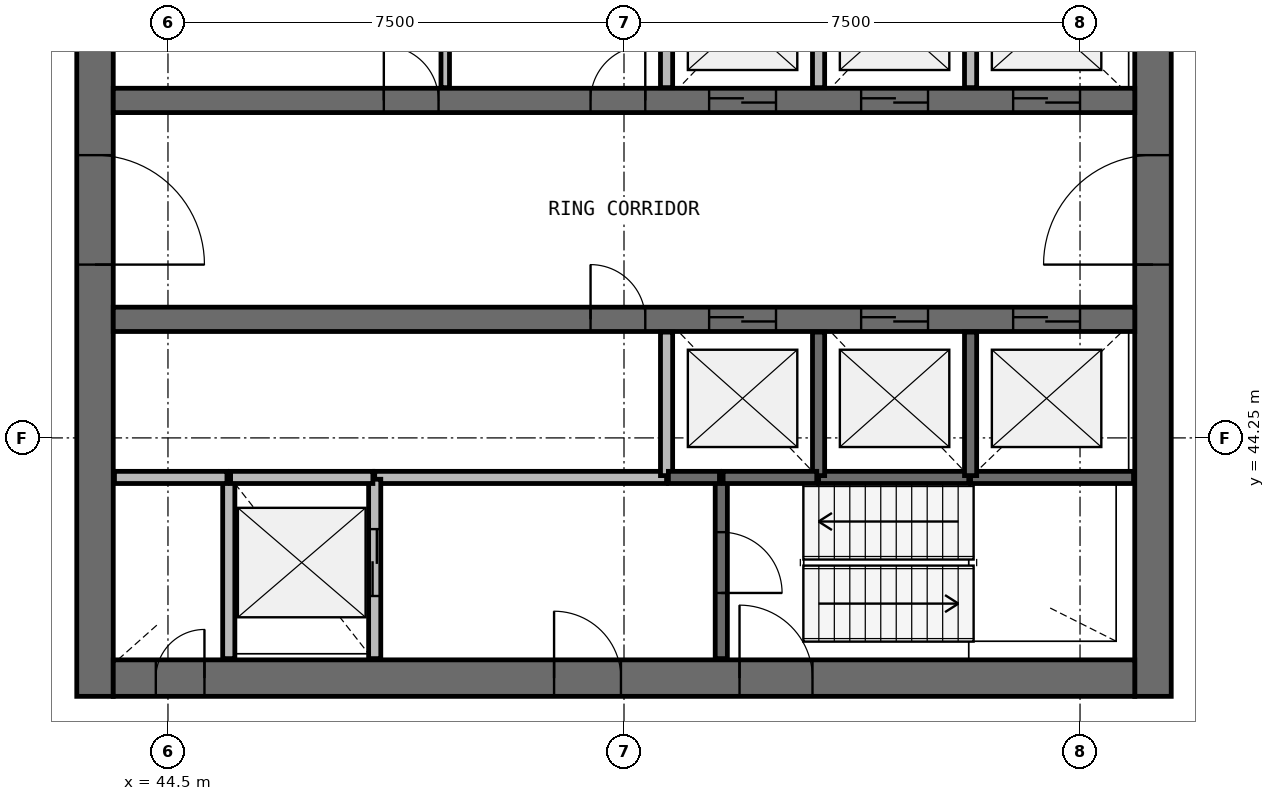
"""IFC4 building model, lengths in metres.
Left out: names, types, materials, properties, quantities, classifications, styles, units other than length and angle.
Written with IfcOpenShell. Run it as: python <this file> out.ifc"""

import sys

from ifc_helpers import new_model, si_unit, direction, frame, frame_2d, origin, place, context, subcontext, project, spatial, rectangle, extrude, source, transform, mapped, element, fill, save


model = new_model("IFC4")
c1 = context("Model", 3, precision=1e-05, world=origin(), true_north=direction((0.0, 1.0)))
c2 = subcontext(c1, "Body", "Model", "MODEL_VIEW")
j1 = project(units=[si_unit("LENGTHUNIT", "METRE"), si_unit("PLANEANGLEUNIT", "RADIAN")], contexts=[c1])
p1 = place(None, origin())
s1 = spatial("IfcSite", under=j1, at=p1, CompositionType="ELEMENT")
p2 = place(p1, origin())
s2 = spatial("IfcBuilding", under=s1, at=p2, CompositionType="ELEMENT")
p3 = place(p2, frame((0.0, 0.0, 187.7)))
s3 = spatial("IfcBuildingStorey", under=s2, at=p3, CompositionType="ELEMENT", Elevation=187.7)
p4 = place(p3, frame((60.7, 40.0, 0.0), z_axis=(0.0, 0.0, 1.0), x_axis=(0.0, 1.0, 0.0)))
e1 = element("IfcWall", 1, at=p4, inside=s3, PredefinedType="SHEAR", context=c2, shape_type="SweptSolid", body=[
    extrude(rectangle(XDim=16.0, YDim=0.6, at=frame_2d((8.0, 0.0))), origin(), (0.0, 0.0, 1.0), 3.9),
])
p5 = place(p4, frame((7.1, 0.0, 0.0)))
e2 = element("IfcOpeningElement", 2, at=p5, cuts=e1, PredefinedType="OPENING", context=c2, shape_type="SweptSolid", body=[
    extrude(rectangle(XDim=1.8, YDim=2.1, at=frame_2d((0.9, 1.05))), frame((0.0, 0.31, 0.0), z_axis=(0.0, -1.0, 0.0), x_axis=(1.0, 0.0, 0.0)), (0.0, 0.0, 1.0), 0.62),
])
p6 = place(p3, frame((43.3, 56.0, 0.0), z_axis=(0.0, 0.0, 1.0), x_axis=(0.0, -1.0, 0.0)))
e3 = element("IfcWall", 3, at=p6, inside=s3, PredefinedType="SHEAR", context=c2, shape_type="SweptSolid", body=[
    extrude(rectangle(XDim=16.0, YDim=0.6, at=frame_2d((8.0, 0.0))), origin(), (0.0, 0.0, 1.0), 3.9),
])
p7 = place(p6, frame((7.1, 0.0, 0.0)))
e4 = element("IfcOpeningElement", 4, at=p7, cuts=e3, PredefinedType="OPENING", context=c2, shape_type="SweptSolid", body=[
    extrude(rectangle(XDim=1.8, YDim=2.1, at=frame_2d((0.9, 1.05))), frame((0.0, 0.31, 0.0), z_axis=(0.0, -1.0, 0.0), x_axis=(1.0, 0.0, 0.0)), (0.0, 0.0, 1.0), 0.62),
])
p8 = place(p3, frame((43.6, 40.3, 0.0), z_axis=(0.0, 0.0, 1.0), x_axis=(1.0, 0.0, 0.0)))
e5 = element("IfcWall", 5, at=p8, inside=s3, PredefinedType="SHEAR", context=c2, shape_type="SweptSolid", body=[
    extrude(rectangle(XDim=16.8, YDim=0.6, at=frame_2d((8.4, 0.0))), origin(), (0.0, 0.0, 1.0), 3.9),
])
p9 = place(p8, frame((10.3, 0.0, 0.0)))
e6 = element("IfcOpeningElement", 6, at=p9, cuts=e5, PredefinedType="OPENING", context=c2, shape_type="SweptSolid", body=[
    extrude(rectangle(XDim=1.2, YDim=2.1, at=frame_2d((0.6, 1.05))), frame((0.0, 0.31, 0.0), z_axis=(0.0, -1.0, 0.0), x_axis=(1.0, 0.0, 0.0)), (0.0, 0.0, 1.0), 0.62),
])
p10 = place(p8, frame((7.25, 0.0, 0.0)))
e7 = element("IfcOpeningElement", 7, at=p10, cuts=e5, PredefinedType="OPENING", context=c2, shape_type="SweptSolid", body=[
    extrude(rectangle(XDim=1.1, YDim=2.1, at=frame_2d((0.55, 1.05))), frame((0.0, 0.31, 0.0), z_axis=(0.0, -1.0, 0.0), x_axis=(1.0, 0.0, 0.0)), (0.0, 0.0, 1.0), 0.62),
])
p11 = place(p8, frame((0.7, 0.0, 0.0)))
e8 = element("IfcOpeningElement", 8, at=p11, cuts=e5, PredefinedType="OPENING", context=c2, shape_type="SweptSolid", body=[
    extrude(rectangle(XDim=0.8, YDim=2.1, at=frame_2d((0.4, 1.05))), frame((0.0, 0.31, 0.0), z_axis=(0.0, -1.0, 0.0), x_axis=(1.0, 0.0, 0.0)), (0.0, 0.0, 1.0), 0.62),
])
p12 = place(p3, frame((43.6, 49.8, 0.0), z_axis=(0.0, 0.0, 1.0), x_axis=(1.0, 0.0, 0.0)))
e9 = element("IfcWall", 9, at=p12, inside=s3, PredefinedType="SHEAR", context=c2, shape_type="SweptSolid", body=[
    extrude(rectangle(XDim=16.8, YDim=0.4, at=frame_2d((8.4, 0.0))), origin(), (0.0, 0.0, 1.0), 3.9),
])
p13 = place(p12, frame((9.8, 0.0, 0.0)))
e10 = element("IfcOpeningElement", 10, at=p13, cuts=e9, PredefinedType="OPENING", context=c2, shape_type="SweptSolid", body=[
    extrude(rectangle(XDim=1.1, YDim=2.1, at=frame_2d((0.55, 1.05))), frame((0.0, 0.21, 0.0), z_axis=(0.0, -1.0, 0.0), x_axis=(1.0, 0.0, 0.0)), (0.0, 0.0, 1.0), 0.42),
])
p14 = place(p12, frame((12.3, 0.0, 0.0)))
e11 = element("IfcOpeningElement", 11, at=p14, cuts=e9, PredefinedType="OPENING", context=c2, shape_type="SweptSolid", body=[
    extrude(rectangle(XDim=1.1, YDim=2.1, at=frame_2d((0.55, 1.05))), frame((0.0, 0.21, 0.0), z_axis=(0.0, -1.0, 0.0), x_axis=(1.0, 0.0, 0.0)), (0.0, 0.0, 1.0), 0.42),
])
p15 = place(p12, frame((14.8, 0.0, 0.0)))
e12 = element("IfcOpeningElement", 12, at=p15, cuts=e9, PredefinedType="OPENING", context=c2, shape_type="SweptSolid", body=[
    extrude(rectangle(XDim=1.1, YDim=2.1, at=frame_2d((0.55, 1.05))), frame((0.0, 0.21, 0.0), z_axis=(0.0, -1.0, 0.0), x_axis=(1.0, 0.0, 0.0)), (0.0, 0.0, 1.0), 0.42),
])
p16 = place(p12, frame((4.45, 0.0, 0.0)))
e13 = element("IfcOpeningElement", 13, at=p16, cuts=e9, PredefinedType="OPENING", context=c2, shape_type="SweptSolid", body=[
    extrude(rectangle(XDim=0.9, YDim=2.1, at=frame_2d((0.45, 1.05))), frame((0.0, 0.21, 0.0), z_axis=(0.0, -1.0, 0.0), x_axis=(1.0, 0.0, 0.0)), (0.0, 0.0, 1.0), 0.42),
])
p17 = place(p12, frame((7.85, 0.0, 0.0)))
e14 = element("IfcOpeningElement", 14, at=p17, cuts=e9, PredefinedType="OPENING", context=c2, shape_type="SweptSolid", body=[
    extrude(rectangle(XDim=0.9, YDim=2.1, at=frame_2d((0.45, 1.05))), frame((0.0, 0.21, 0.0), z_axis=(0.0, -1.0, 0.0), x_axis=(1.0, 0.0, 0.0)), (0.0, 0.0, 1.0), 0.42),
])
p18 = place(p3, frame((43.6, 46.2, 0.0), z_axis=(0.0, 0.0, 1.0), x_axis=(1.0, 0.0, 0.0)))
e15 = element("IfcWall", 15, at=p18, inside=s3, PredefinedType="SHEAR", context=c2, shape_type="SweptSolid", body=[
    extrude(rectangle(XDim=16.8, YDim=0.4, at=frame_2d((8.4, 0.0))), origin(), (0.0, 0.0, 1.0), 3.9),
])
p19 = place(p18, frame((9.8, 0.0, 0.0)))
e16 = element("IfcOpeningElement", 16, at=p19, cuts=e15, PredefinedType="OPENING", context=c2, shape_type="SweptSolid", body=[
    extrude(rectangle(XDim=1.1, YDim=2.1, at=frame_2d((0.55, 1.05))), frame((0.0, 0.21, 0.0), z_axis=(0.0, -1.0, 0.0), x_axis=(1.0, 0.0, 0.0)), (0.0, 0.0, 1.0), 0.42),
])
p20 = place(p18, frame((12.3, 0.0, 0.0)))
e17 = element("IfcOpeningElement", 17, at=p20, cuts=e15, PredefinedType="OPENING", context=c2, shape_type="SweptSolid", body=[
    extrude(rectangle(XDim=1.1, YDim=2.1, at=frame_2d((0.55, 1.05))), frame((0.0, 0.21, 0.0), z_axis=(0.0, -1.0, 0.0), x_axis=(1.0, 0.0, 0.0)), (0.0, 0.0, 1.0), 0.42),
])
p21 = place(p18, frame((14.8, 0.0, 0.0)))
e18 = element("IfcOpeningElement", 18, at=p21, cuts=e15, PredefinedType="OPENING", context=c2, shape_type="SweptSolid", body=[
    extrude(rectangle(XDim=1.1, YDim=2.1, at=frame_2d((0.55, 1.05))), frame((0.0, 0.21, 0.0), z_axis=(0.0, -1.0, 0.0), x_axis=(1.0, 0.0, 0.0)), (0.0, 0.0, 1.0), 0.42),
])
p22 = place(p18, frame((7.85, 0.0, 0.0)))
e19 = element("IfcOpeningElement", 19, at=p22, cuts=e15, PredefinedType="OPENING", context=c2, shape_type="SweptSolid", body=[
    extrude(rectangle(XDim=0.9, YDim=2.1, at=frame_2d((0.45, 1.05))), frame((0.0, 0.21, 0.0), z_axis=(0.0, -1.0, 0.0), x_axis=(1.0, 0.0, 0.0)), (0.0, 0.0, 1.0), 0.42),
])
p23 = place(p3, frame((52.7, 43.6, 0.0), z_axis=(0.0, 0.0, 1.0), x_axis=(-1.0, 0.0, 0.0)))
e20 = element("IfcWall", 20, at=p23, inside=s3, PredefinedType="SOLIDWALL", context=c2, shape_type="SweptSolid", body=[
    extrude(rectangle(XDim=4.8, YDim=0.2, at=frame_2d((2.4, 0.0))), origin(), (0.0, 0.0, 1.0), 3.58),
])
p24 = place(p3, frame((45.5, 43.6, 0.0), z_axis=(0.0, 0.0, 1.0), x_axis=(0.0, -1.0, 0.0)))
e21 = element("IfcWall", 21, at=p24, inside=s3, PredefinedType="SOLIDWALL", context=c2, shape_type="SweptSolid", body=[
    extrude(rectangle(XDim=2.98, YDim=0.2, at=frame_2d((1.49, 0.0))), origin(), (0.0, 0.0, 1.0), 3.58),
])
p25 = place(p3, frame((47.9, 40.62, 0.0), z_axis=(0.0, 0.0, 1.0), x_axis=(0.0, 1.0, 0.0)))
e22 = element("IfcWall", 22, at=p25, inside=s3, PredefinedType="SOLIDWALL", context=c2, shape_type="SweptSolid", body=[
    extrude(rectangle(XDim=2.95, YDim=0.2, at=frame_2d((1.475, 0.0))), origin(), (0.0, 0.0, 1.0), 3.58),
])
p26 = place(p25, frame((1.03, 0.0, 0.0)))
e23 = element("IfcOpeningElement", 23, at=p26, cuts=e22, PredefinedType="OPENING", context=c2, shape_type="SweptSolid", body=[
    extrude(rectangle(XDim=1.1, YDim=2.1, at=frame_2d((0.55, 1.05))), frame((0.0, 0.11, 0.0), z_axis=(0.0, -1.0, 0.0), x_axis=(1.0, 0.0, 0.0)), (0.0, 0.0, 1.0), 0.22),
])
p27 = place(p3, frame((53.6, 43.6, 0.0), z_axis=(0.0, 0.0, 1.0), x_axis=(0.0, -1.0, 0.0)))
e24 = element("IfcWall", 24, at=p27, inside=s3, PredefinedType="SOLIDWALL", context=c2, shape_type="SweptSolid", body=[
    extrude(rectangle(XDim=2.98, YDim=0.2, at=frame_2d((1.49, 0.0))), origin(), (0.0, 0.0, 1.0), 3.58),
])
p28 = place(p27, frame((0.9, 0.0, 0.0)))
e25 = element("IfcOpeningElement", 25, at=p28, cuts=e24, PredefinedType="OPENING", context=c2, shape_type="SweptSolid", body=[
    extrude(rectangle(XDim=1.0, YDim=2.1, at=frame_2d((0.5, 1.05))), frame((0.0, 0.11, 0.0), z_axis=(0.0, -1.0, 0.0), x_axis=(1.0, 0.0, 0.0)), (0.0, 0.0, 1.0), 0.22),
])
p29 = place(p3, frame((57.7, 43.6, 0.0), z_axis=(0.0, 0.0, 1.0), x_axis=(1.0, 0.0, 0.0)))
e26 = element("IfcWall", 26, at=p29, inside=s3, PredefinedType="SOLIDWALL", context=c2, shape_type="SweptSolid", body=[
    extrude(rectangle(XDim=2.68, YDim=0.2, at=frame_2d((1.34, 0.0))), origin(), (0.0, 0.0, 1.0), 3.58),
])
p30 = place(p3, frame((55.2, 43.6, 0.0), z_axis=(0.0, 0.0, 1.0), x_axis=(1.0, 0.0, 0.0)))
e27 = element("IfcWall", 27, at=p30, inside=s3, PredefinedType="SOLIDWALL", context=c2, shape_type="SweptSolid", body=[
    extrude(rectangle(XDim=2.47, YDim=0.2, at=frame_2d((1.235, 0.0))), origin(), (0.0, 0.0, 1.0), 3.58),
])
p31 = place(p3, frame((47.87, 43.6, 0.0), z_axis=(0.0, 0.0, 1.0), x_axis=(-1.0, 0.0, 0.0)))
e28 = element("IfcWall", 28, at=p31, inside=s3, PredefinedType="SOLIDWALL", context=c2, shape_type="SweptSolid", body=[
    extrude(rectangle(XDim=2.34, YDim=0.2, at=frame_2d((1.17, 0.0))), origin(), (0.0, 0.0, 1.0), 3.58),
])
for number, where, z_axis, x_axis in (
    (29, (52.7, 45.99, 0.0), (0.0, 0.0, 1.0), (0.0, -1.0, 0.0)),
    (30, (52.7, 52.37, 0.0), (0.0, 0.0, 1.0), (0.0, -1.0, 0.0)),
    (31, (55.2, 43.63, 0.0), (0.0, 0.0, 1.0), (0.0, 1.0, 0.0)),
    (32, (55.2, 50.01, 0.0), (0.0, 0.0, 1.0), (0.0, 1.0, 0.0)),
    (33, (57.7, 43.63, 0.0), (0.0, 0.0, 1.0), (0.0, 1.0, 0.0)),
):
    element("IfcWall", number, at=place(p3, frame(where, z_axis=z_axis, x_axis=x_axis)), inside=s3, PredefinedType="SOLIDWALL", context=c2, shape_type="SweptSolid", body=[
        extrude(rectangle(XDim=2.36, YDim=0.2, at=frame_2d((1.18, 0.0))), origin(), (0.0, 0.0, 1.0), 3.58),
    ])
p32 = place(p3, frame((57.7, 50.01, 0.0), z_axis=(0.0, 0.0, 1.0), x_axis=(0.0, 1.0, 0.0)))
e34 = element("IfcWall", 34, at=p32, inside=s3, PredefinedType="SOLIDWALL", context=c2, shape_type="SweptSolid", body=[
    extrude(rectangle(XDim=2.39, YDim=0.2, at=frame_2d((1.195, 0.0))), origin(), (0.0, 0.0, 1.0), 3.58),
])
p33 = place(p3, frame((45.47, 43.6, 0.0), z_axis=(0.0, 0.0, 1.0), x_axis=(-1.0, 0.0, 0.0)))
e35 = element("IfcWall", 35, at=p33, inside=s3, PredefinedType="SOLIDWALL", context=c2, shape_type="SweptSolid", body=[
    extrude(rectangle(XDim=1.85, YDim=0.2, at=frame_2d((0.925, 0.0))), origin(), (0.0, 0.0, 1.0), 3.58),
])
p34 = place(p3, frame((53.63, 43.6, 0.0), z_axis=(0.0, 0.0, 1.0), x_axis=(1.0, 0.0, 0.0)))
e36 = element("IfcWall", 36, at=p34, inside=s3, PredefinedType="SOLIDWALL", context=c2, shape_type="SweptSolid", body=[
    extrude(rectangle(XDim=1.54, YDim=0.2, at=frame_2d((0.77, 0.0))), origin(), (0.0, 0.0, 1.0), 3.58),
])
p35 = place(p3, frame((52.73, 43.6, 0.0), z_axis=(0.0, 0.0, 1.0), x_axis=(1.0, 0.0, 0.0)))
e37 = element("IfcWall", 37, at=p35, inside=s3, PredefinedType="SOLIDWALL", context=c2, shape_type="SweptSolid", body=[
    extrude(rectangle(XDim=0.84, YDim=0.2, at=frame_2d((0.42, 0.0))), origin(), (0.0, 0.0, 1.0), 3.58),
])
p36 = place(p3, frame((49.06, 50.01, 0.0), z_axis=(0.0, 0.0, 1.0), x_axis=(0.0, 1.0, 0.0)))
e38 = element("IfcWall", 38, at=p36, inside=s3, PredefinedType="PARTITIONING", context=c2, shape_type="SweptSolid", body=[
    extrude(rectangle(XDim=2.29, YDim=0.14, at=frame_2d((1.145, 0.0))), origin(), (0.0, 0.0, 1.0), 2.88),
])
m1 = source(origin(), c2, "Body", "SweptSolid", [
    extrude(rectangle(XDim=1.8, YDim=2.1, at=frame_2d((0.9, 1.05))), frame((0.0, 0.025, 0.0), z_axis=(0.0, -1.0, 0.0), x_axis=(1.0, 0.0, 0.0)), (0.0, 0.0, 1.0), 0.05),
])
p37 = place(p7, origin())
e39 = element("IfcDoor", 39, at=p37, inside=s3, OperationType="SINGLE_SWING_RIGHT", PredefinedType="DOOR", context=c2, shape_type="MappedRepresentation", body=[
    mapped(m1, transform((0.0, 0.0, 0.0), scale=1.0)),
])
fill(e4, e39)
p38 = place(p5, origin())
e40 = element("IfcDoor", 40, at=p38, inside=s3, OperationType="SINGLE_SWING_LEFT", PredefinedType="DOOR", context=c2, shape_type="MappedRepresentation", body=[
    mapped(m1, transform((0.0, 0.0, 0.0), scale=1.0)),
])
fill(e2, e40)
m2 = source(origin(), c2, "Body", "SweptSolid", [
    extrude(rectangle(XDim=1.1, YDim=2.1, at=frame_2d((0.55, 1.05))), frame((0.0, 0.025, 0.0), z_axis=(0.0, -1.0, 0.0), x_axis=(1.0, 0.0, 0.0)), (0.0, 0.0, 1.0), 0.05),
])
p39 = place(p13, origin())
e41 = element("IfcDoor", 41, at=p39, inside=s3, OperationType="DOUBLE_DOOR_SLIDING", PredefinedType="USERDEFINED", context=c2, shape_type="MappedRepresentation", body=[
    mapped(m2, transform((0.0, 0.0, 0.0), scale=1.0)),
])
fill(e10, e41)
p40 = place(p14, origin())
e42 = element("IfcDoor", 42, at=p40, inside=s3, OperationType="DOUBLE_DOOR_SLIDING", PredefinedType="USERDEFINED", context=c2, shape_type="MappedRepresentation", body=[
    mapped(m2, transform((0.0, 0.0, 0.0), scale=1.0)),
])
fill(e11, e42)
p41 = place(p15, origin())
e43 = element("IfcDoor", 43, at=p41, inside=s3, OperationType="DOUBLE_DOOR_SLIDING", PredefinedType="USERDEFINED", context=c2, shape_type="MappedRepresentation", body=[
    mapped(m2, transform((0.0, 0.0, 0.0), scale=1.0)),
])
fill(e12, e43)
p42 = place(p19, origin())
e44 = element("IfcDoor", 44, at=p42, inside=s3, OperationType="DOUBLE_DOOR_SLIDING", PredefinedType="USERDEFINED", context=c2, shape_type="MappedRepresentation", body=[
    mapped(m2, transform((0.0, 0.0, 0.0), scale=1.0)),
])
fill(e16, e44)
p43 = place(p20, origin())
e45 = element("IfcDoor", 45, at=p43, inside=s3, OperationType="DOUBLE_DOOR_SLIDING", PredefinedType="USERDEFINED", context=c2, shape_type="MappedRepresentation", body=[
    mapped(m2, transform((0.0, 0.0, 0.0), scale=1.0)),
])
fill(e17, e45)
p44 = place(p21, origin())
e46 = element("IfcDoor", 46, at=p44, inside=s3, OperationType="DOUBLE_DOOR_SLIDING", PredefinedType="USERDEFINED", context=c2, shape_type="MappedRepresentation", body=[
    mapped(m2, transform((0.0, 0.0, 0.0), scale=1.0)),
])
fill(e18, e46)
p45 = place(p26, origin())
e47 = element("IfcDoor", 47, at=p45, inside=s3, OperationType="DOUBLE_DOOR_SLIDING", PredefinedType="USERDEFINED", context=c2, shape_type="MappedRepresentation", body=[
    mapped(m2, transform((0.0, 0.0, 0.0), scale=1.0)),
])
fill(e23, e47)
m3 = source(origin(), c2, "Body", "SweptSolid", [
    extrude(rectangle(XDim=1.2, YDim=2.1, at=frame_2d((0.6, 1.05))), frame((0.0, 0.025, 0.0), z_axis=(0.0, -1.0, 0.0), x_axis=(1.0, 0.0, 0.0)), (0.0, 0.0, 1.0), 0.05),
])
p46 = place(p9, origin())
e48 = element("IfcDoor", 48, at=p46, inside=s3, OperationType="SINGLE_SWING_LEFT", PredefinedType="DOOR", context=c2, shape_type="MappedRepresentation", body=[
    mapped(m3, transform((0.0, 0.0, 0.0), scale=1.0)),
])
fill(e6, e48)
m4 = source(origin(), c2, "Body", "SweptSolid", [
    extrude(rectangle(XDim=1.0, YDim=2.1, at=frame_2d((0.5, 1.05))), frame((0.0, 0.025, 0.0), z_axis=(0.0, -1.0, 0.0), x_axis=(1.0, 0.0, 0.0)), (0.0, 0.0, 1.0), 0.05),
])
p47 = place(p28, origin())
e49 = element("IfcDoor", 49, at=p47, inside=s3, OperationType="SINGLE_SWING_RIGHT", PredefinedType="DOOR", context=c2, shape_type="MappedRepresentation", body=[
    mapped(m4, transform((0.0, 0.0, 0.0), scale=1.0)),
])
fill(e25, e49)
m5 = source(origin(), c2, "Body", "SweptSolid", [
    extrude(rectangle(XDim=1.1, YDim=2.1, at=frame_2d((0.55, 1.05))), frame((0.0, 0.025, 0.0), z_axis=(0.0, -1.0, 0.0), x_axis=(1.0, 0.0, 0.0)), (0.0, 0.0, 1.0), 0.05),
])
p48 = place(p10, origin())
e50 = element("IfcDoor", 50, at=p48, inside=s3, OperationType="SINGLE_SWING_LEFT", PredefinedType="DOOR", context=c2, shape_type="MappedRepresentation", body=[
    mapped(m5, transform((0.0, 0.0, 0.0), scale=1.0)),
])
fill(e7, e50)
m6 = source(origin(), c2, "Body", "SweptSolid", [
    extrude(rectangle(XDim=0.8, YDim=2.1, at=frame_2d((0.4, 1.05))), frame((0.0, 0.025, 0.0), z_axis=(0.0, -1.0, 0.0), x_axis=(1.0, 0.0, 0.0)), (0.0, 0.0, 1.0), 0.05),
])
p49 = place(p11, origin())
e51 = element("IfcDoor", 51, at=p49, inside=s3, OperationType="SINGLE_SWING_RIGHT", PredefinedType="DOOR", context=c2, shape_type="MappedRepresentation", body=[
    mapped(m6, transform((0.0, 0.0, 0.0), scale=1.0)),
])
fill(e8, e51)
m7 = source(origin(), c2, "Body", "SweptSolid", [
    extrude(rectangle(XDim=0.9, YDim=2.1, at=frame_2d((0.45, 1.05))), frame((0.0, 0.025, 0.0), z_axis=(0.0, -1.0, 0.0), x_axis=(1.0, 0.0, 0.0)), (0.0, 0.0, 1.0), 0.05),
])
p50 = place(p16, origin())
e52 = element("IfcDoor", 52, at=p50, inside=s3, OperationType="SINGLE_SWING_LEFT", PredefinedType="DOOR", context=c2, shape_type="MappedRepresentation", body=[
    mapped(m7, transform((0.0, 0.0, 0.0), scale=1.0)),
])
fill(e13, e52)
p51 = place(p17, origin())
e53 = element("IfcDoor", 53, at=p51, inside=s3, OperationType="SINGLE_SWING_RIGHT", PredefinedType="DOOR", context=c2, shape_type="MappedRepresentation", body=[
    mapped(m7, transform((0.0, 0.0, 0.0), scale=1.0)),
])
fill(e14, e53)
p52 = place(p22, origin())
e54 = element("IfcDoor", 54, at=p52, inside=s3, OperationType="SINGLE_SWING_LEFT", PredefinedType="DOOR", context=c2, shape_type="MappedRepresentation", body=[
    mapped(m7, transform((0.0, 0.0, 0.0), scale=1.0)),
])
fill(e19, e54)
save(model, sys.argv[1])
